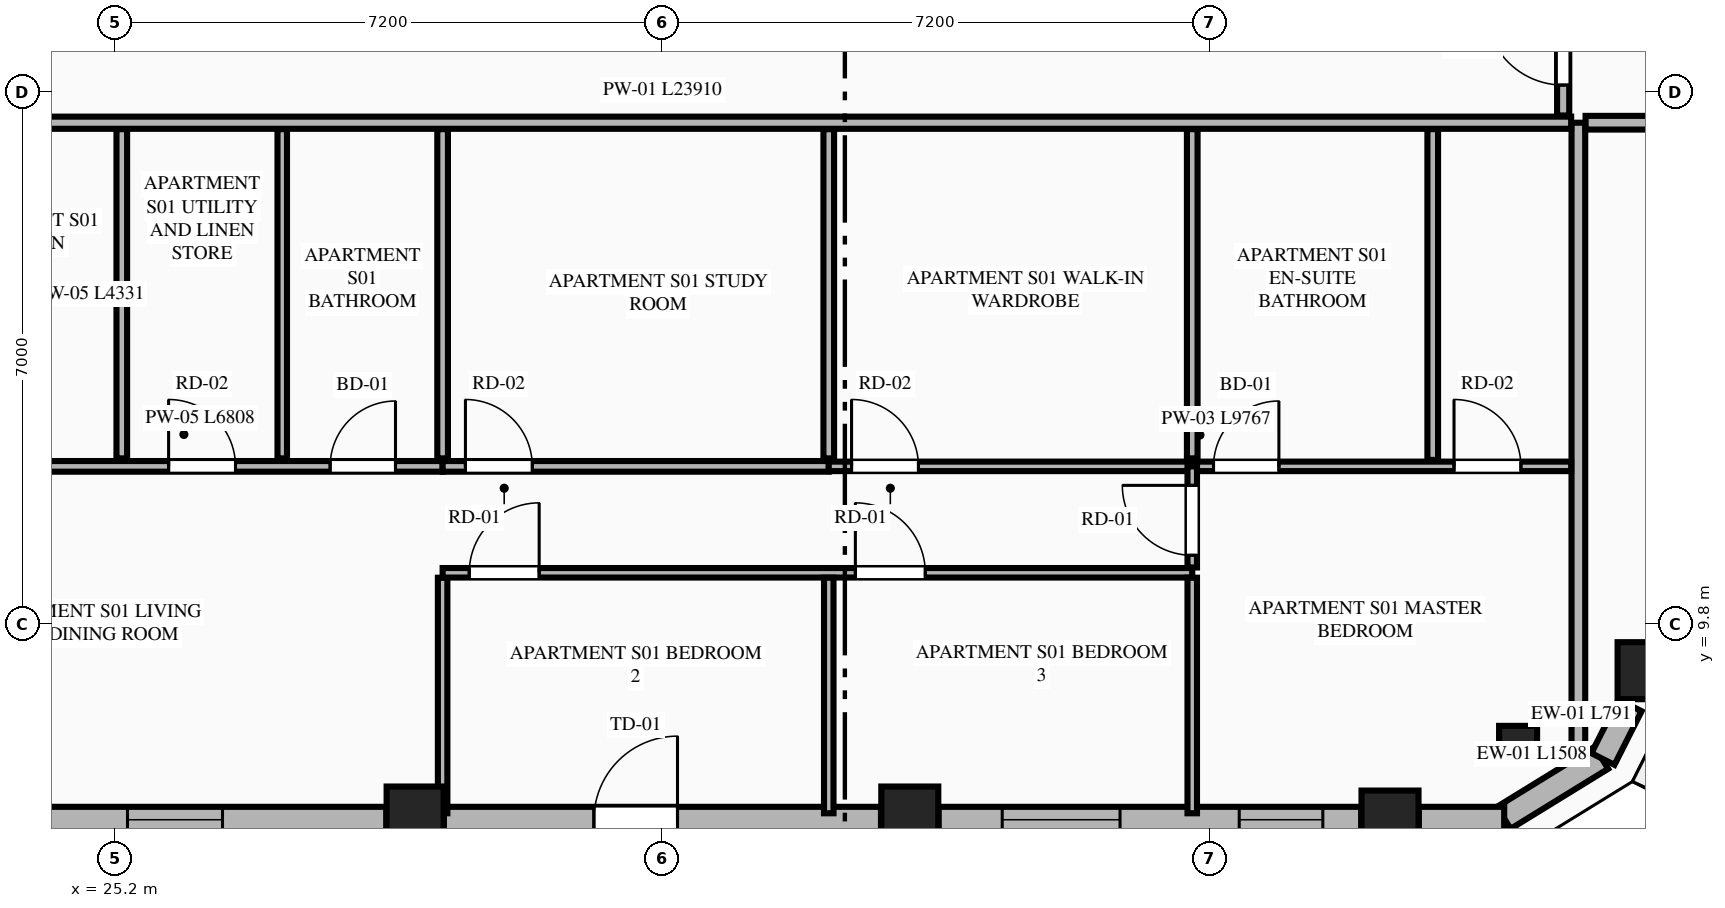
"""IFC4 building model, lengths in metres.
Left out: names, types, materials, properties, quantities, classifications, styles, units other than length and angle.
Written with IfcOpenShell. Run it as: python <this file> out.ifc"""

import sys

from ifc_helpers import new_model, si_unit, direction, frame, frame_2d, origin, origin_2d, place, context, subcontext, project, spatial, rectangle, extrude, element, fill, save


model = new_model("IFC4")
c1 = context("Model", 3, precision=1e-05, world=origin(), true_north=direction((0.0, 1.0)))
c2 = subcontext(c1, "Body", "Model", "MODEL_VIEW")
j1 = project(units=[si_unit("LENGTHUNIT", "METRE"), si_unit("PLANEANGLEUNIT", "RADIAN")], contexts=[c1])
p1 = place(None, origin())
s1 = spatial("IfcSite", under=j1, at=p1, CompositionType="ELEMENT")
p2 = place(p1, origin())
s2 = spatial("IfcBuilding", under=s1, at=p2, CompositionType="ELEMENT")
p3 = place(p2, frame((0.0, 0.0, 252.55)))
s3 = spatial("IfcBuildingStorey", under=s2, at=p3, CompositionType="ELEMENT", Elevation=252.55)
for number, where, z_axis, x_axis in (
    (1, (29.146, 7.292, 0.0), (0.0, 0.0, 1.0), (1.0, 0.0, 0.0)),
    (2, (35.654, 7.292, 0.0), (0.0, 0.0, 1.0), (1.0, 0.0, 0.0)),
    (3, (41.972, 7.239, 0.0), (0.0, 0.0, 1.0), (1.0, 0.0, 0.0)),
    (4, (45.341, 9.191, 0.0), (0.0, 0.0, 1.0), (1.0, 0.0, 0.0)),
):
    element("IfcColumn", number, at=place(p3, frame(where, z_axis=z_axis, x_axis=x_axis)), inside=s3, PredefinedType="COLUMN", context=c2, shape_type="SweptSolid", body=[
        extrude(rectangle(XDim=0.75, YDim=0.75, at=origin_2d()), origin(), (0.0, 0.0, 1.0), 3.65),
    ])
p4 = place(p3, frame((43.657, 8.215, 0.0), z_axis=(0.0, 0.0, 1.0), x_axis=(0.865256437757, 0.501329529272, 0.0)))
e5 = element("IfcColumn", 5, at=p4, inside=s3, PredefinedType="PILASTER", context=c2, shape_type="SweptSolid", body=[
    extrude(rectangle(XDim=0.5, YDim=0.35, at=origin_2d()), origin(), (0.0, 0.0, 1.0), 3.65),
])
p5 = place(p3, frame((43.469, 7.255, 0.0), z_axis=(0.0, 0.0, 1.0), x_axis=(0.851680557619, 0.52406128246, 0.0)))
e6 = element("IfcWall", 6, at=p5, inside=s3, PredefinedType="STANDARD", context=c2, shape_type="SweptSolid", body=[
    extrude(rectangle(XDim=1.508, YDim=0.34, at=frame_2d((0.754, 0.0))), origin(), (0.0, 0.0, 1.0), 3.45),
])
p6 = place(p3, frame((23.207, 7.23, 0.0), z_axis=(0.0, 0.0, 1.0), x_axis=(1.0, 0.0, 0.0)))
e7 = element("IfcWall", 7, at=p6, inside=s3, PredefinedType="STANDARD", context=c2, shape_type="SweptSolid", body=[
    extrude(rectangle(XDim=5.56, YDim=0.34, at=frame_2d((2.78, 0.0))), origin(), (0.0, 0.0, 1.0), 2.983),
])
p7 = place(p6, frame((2.155, 0.0, 0.75)))
e8 = element("IfcOpeningElement", 8, at=p7, cuts=e7, PredefinedType="OPENING", context=c2, shape_type="SweptSolid", body=[
    extrude(rectangle(XDim=1.25, YDim=1.95, at=frame_2d((0.625, 0.975))), frame((0.0, 0.18, 0.0), z_axis=(0.0, -1.0, 0.0), x_axis=(1.0, 0.0, 0.0)), (0.0, 0.0, 1.0), 0.36),
])
p8 = place(p3, frame((29.525, 7.23, 0.0), z_axis=(0.0, 0.0, 1.0), x_axis=(1.0, 0.0, 0.0)))
e9 = element("IfcWall", 9, at=p8, inside=s3, PredefinedType="STANDARD", context=c2, shape_type="SweptSolid", body=[
    extrude(rectangle(XDim=5.75, YDim=0.34, at=frame_2d((2.875, 0.0))), origin(), (0.0, 0.0, 1.0), 2.983),
])
p9 = place(p8, frame((1.973, 0.0, 0.0)))
e10 = element("IfcOpeningElement", 10, at=p9, cuts=e9, PredefinedType="OPENING", context=c2, shape_type="SweptSolid", body=[
    extrude(rectangle(XDim=1.1, YDim=2.25, at=frame_2d((0.55, 1.125))), frame((0.0, 0.18, 0.0), z_axis=(0.0, -1.0, 0.0), x_axis=(1.0, 0.0, 0.0)), (0.0, 0.0, 1.0), 0.36),
])
p10 = place(p3, frame((36.033, 7.23, 0.0), z_axis=(0.0, 0.0, 1.0), x_axis=(1.0, 0.0, 0.0)))
e11 = element("IfcWall", 11, at=p10, inside=s3, PredefinedType="STANDARD", context=c2, shape_type="SweptSolid", body=[
    extrude(rectangle(XDim=5.56, YDim=0.34, at=frame_2d((2.78, 0.0))), origin(), (0.0, 0.0, 1.0), 2.983),
])
p11 = place(p10, frame((0.837, 0.0, 0.75)))
e12 = element("IfcOpeningElement", 12, at=p11, cuts=e11, PredefinedType="OPENING", context=c2, shape_type="SweptSolid", body=[
    extrude(rectangle(XDim=1.55, YDim=2.05, at=frame_2d((0.775, 1.025))), frame((0.0, 0.18, 0.0), z_axis=(0.0, -1.0, 0.0), x_axis=(1.0, 0.0, 0.0)), (0.0, 0.0, 1.0), 0.36),
])
p12 = place(p10, frame((3.955, 0.0, 0.75)))
e13 = element("IfcOpeningElement", 13, at=p12, cuts=e11, PredefinedType="OPENING", context=c2, shape_type="SweptSolid", body=[
    extrude(rectangle(XDim=1.1, YDim=2.0, at=frame_2d((0.55, 1.0))), frame((0.0, 0.18, 0.0), z_axis=(0.0, -1.0, 0.0), x_axis=(1.0, 0.0, 0.0)), (0.0, 0.0, 1.0), 0.36),
])
p13 = place(p3, frame((42.351, 7.23, 0.0), z_axis=(0.0, 0.0, 1.0), x_axis=(1.0, 0.0, 0.0)))
e14 = element("IfcWall", 14, at=p13, inside=s3, PredefinedType="STANDARD", context=c2, shape_type="SweptSolid", body=[
    extrude(rectangle(XDim=1.123, YDim=0.34, at=frame_2d((0.562, 0.0))), origin(), (0.0, 0.0, 1.0), 3.45),
])
p14 = place(p3, frame((44.773, 8.029, 0.0), z_axis=(0.0, 0.0, 1.0), x_axis=(0.451159191899, 0.892443490404, 0.0)))
e15 = element("IfcWall", 15, at=p14, inside=s3, PredefinedType="STANDARD", context=c2, shape_type="SweptSolid", body=[
    extrude(rectangle(XDim=0.791, YDim=0.34, at=frame_2d((0.396, 0.0))), origin(), (0.0, 0.0, 1.0), 3.45),
])
p15 = place(p3, frame((44.45, 8.119, 0.0), z_axis=(0.0, 0.0, 1.0), x_axis=(0.0, 1.0, 0.0)))
e16 = element("IfcWall", 16, at=p15, inside=s3, PredefinedType="PARTITIONING", context=c2, shape_type="SweptSolid", body=[
    extrude(rectangle(XDim=8.281, YDim=0.18, at=frame_2d((4.141, 0.0))), origin(), (0.0, 0.0, 1.0), 3.45),
])
p16 = place(p3, frame((20.445, 16.4, 0.0), z_axis=(0.0, 0.0, 1.0), x_axis=(1.0, 0.0, 0.0)))
e17 = element("IfcWall", 17, at=p16, inside=s3, PredefinedType="PARTITIONING", context=c2, shape_type="SweptSolid", body=[
    extrude(rectangle(XDim=23.91, YDim=0.16, at=frame_2d((11.955, 0.0))), origin(), (0.0, 0.0, 1.0), 3.45),
])
p17 = place(p16, frame((0.705, 0.0, 0.0)))
e18 = element("IfcOpeningElement", 18, at=p17, cuts=e17, PredefinedType="OPENING", context=c2, shape_type="SweptSolid", body=[
    extrude(rectangle(XDim=1.35, YDim=2.35, at=frame_2d((0.675, 1.175))), frame((0.0, 0.09, 0.0), z_axis=(0.0, -1.0, 0.0), x_axis=(1.0, 0.0, 0.0)), (0.0, 0.0, 1.0), 0.18),
])
p18 = place(p3, frame((22.7, 11.879, 0.0), z_axis=(0.0, 0.0, 1.0), x_axis=(1.0, 0.0, 0.0)))
e19 = element("IfcWall", 19, at=p18, inside=s3, PredefinedType="PLUMBINGWALL", context=c2, shape_type="SweptSolid", body=[
    extrude(rectangle(XDim=6.808, YDim=0.14, at=frame_2d((3.404, 0.0))), origin(), (0.0, 0.0, 1.0), 3.45),
])
p19 = place(p18, frame((5.328, 0.0, 0.0)))
e20 = element("IfcOpeningElement", 20, at=p19, cuts=e19, PredefinedType="OPENING", context=c2, shape_type="SweptSolid", body=[
    extrude(rectangle(XDim=0.86, YDim=2.1, at=frame_2d((0.43, 1.05))), frame((0.0, 0.08, 0.0), z_axis=(0.0, -1.0, 0.0), x_axis=(1.0, 0.0, 0.0)), (0.0, 0.0, 1.0), 0.16),
])
p20 = place(p18, frame((0.26, 0.0, 0.0)))
e21 = element("IfcOpeningElement", 21, at=p20, cuts=e19, PredefinedType="OPENING", context=c2, shape_type="SweptSolid", body=[
    extrude(rectangle(XDim=0.88, YDim=2.15, at=frame_2d((0.44, 1.075))), frame((0.0, 0.08, 0.0), z_axis=(0.0, -1.0, 0.0), x_axis=(1.0, 0.0, 0.0)), (0.0, 0.0, 1.0), 0.16),
])
p21 = place(p18, frame((3.203, 0.0, 0.0)))
e22 = element("IfcOpeningElement", 22, at=p21, cuts=e19, PredefinedType="OPENING", context=c2, shape_type="SweptSolid", body=[
    extrude(rectangle(XDim=0.88, YDim=2.15, at=frame_2d((0.44, 1.075))), frame((0.0, 0.08, 0.0), z_axis=(0.0, -1.0, 0.0), x_axis=(1.0, 0.0, 0.0)), (0.0, 0.0, 1.0), 0.16),
])
p22 = place(p3, frame((29.508, 11.879, 0.0), z_axis=(0.0, 0.0, 1.0), x_axis=(1.0, 0.0, 0.0)))
e23 = element("IfcWall", 23, at=p22, inside=s3, PredefinedType="PLUMBINGWALL", context=c2, shape_type="SweptSolid", body=[
    extrude(rectangle(XDim=5.08, YDim=0.14, at=frame_2d((2.54, 0.0))), origin(), (0.0, 0.0, 1.0), 3.45),
])
p23 = place(p22, frame((0.3, 0.0, 0.0)))
e24 = element("IfcOpeningElement", 24, at=p23, cuts=e23, PredefinedType="OPENING", context=c2, shape_type="SweptSolid", body=[
    extrude(rectangle(XDim=0.88, YDim=2.15, at=frame_2d((0.44, 1.075))), frame((0.0, 0.08, 0.0), z_axis=(0.0, -1.0, 0.0), x_axis=(1.0, 0.0, 0.0)), (0.0, 0.0, 1.0), 0.16),
])
p24 = place(p3, frame((34.588, 11.879, 0.0), z_axis=(0.0, 0.0, 1.0), x_axis=(1.0, 0.0, 0.0)))
e25 = element("IfcWall", 25, at=p24, inside=s3, PredefinedType="PARTITIONING", context=c2, shape_type="SweptSolid", body=[
    extrude(rectangle(XDim=9.767, YDim=0.125, at=frame_2d((4.884, 0.0))), origin(), (0.0, 0.0, 1.0), 3.45),
])
p25 = place(p24, frame((5.062, 0.0, 0.0)))
e26 = element("IfcOpeningElement", 26, at=p25, cuts=e25, PredefinedType="OPENING", context=c2, shape_type="SweptSolid", body=[
    extrude(rectangle(XDim=0.86, YDim=2.1, at=frame_2d((0.43, 1.05))), frame((0.0, 0.073, 0.0), z_axis=(0.0, -1.0, 0.0), x_axis=(1.0, 0.0, 0.0)), (0.0, 0.0, 1.0), 0.145),
])
p26 = place(p24, frame((8.226, 0.0, 0.0)))
e27 = element("IfcOpeningElement", 27, at=p26, cuts=e25, PredefinedType="OPENING", context=c2, shape_type="SweptSolid", body=[
    extrude(rectangle(XDim=0.88, YDim=2.15, at=frame_2d((0.44, 1.075))), frame((0.0, 0.073, 0.0), z_axis=(0.0, -1.0, 0.0), x_axis=(1.0, 0.0, 0.0)), (0.0, 0.0, 1.0), 0.145),
])
p27 = place(p24, frame((0.3, 0.0, 0.0)))
e28 = element("IfcOpeningElement", 28, at=p27, cuts=e25, PredefinedType="OPENING", context=c2, shape_type="SweptSolid", body=[
    extrude(rectangle(XDim=0.88, YDim=2.15, at=frame_2d((0.44, 1.075))), frame((0.0, 0.073, 0.0), z_axis=(0.0, -1.0, 0.0), x_axis=(1.0, 0.0, 0.0)), (0.0, 0.0, 1.0), 0.145),
])
p28 = place(p3, frame((25.287, 11.984, 0.0), z_axis=(0.0, 0.0, 1.0), x_axis=(0.0, 1.0, 0.0)))
e29 = element("IfcWall", 29, at=p28, inside=s3, PredefinedType="PLUMBINGWALL", context=c2, shape_type="SweptSolid", body=[
    extrude(rectangle(XDim=4.331, YDim=0.14, at=frame_2d((2.166, 0.0))), origin(), (0.0, 0.0, 1.0), 3.45),
])
p29 = place(p3, frame((27.398, 11.984, 0.0), z_axis=(0.0, 0.0, 1.0), x_axis=(0.0, 1.0, 0.0)))
e30 = element("IfcWall", 30, at=p29, inside=s3, PredefinedType="PARTITIONING", context=c2, shape_type="SweptSolid", body=[
    extrude(rectangle(XDim=4.331, YDim=0.125, at=frame_2d((2.166, 0.0))), origin(), (0.0, 0.0, 1.0), 3.45),
])
p30 = place(p3, frame((29.508, 7.315, 0.0), z_axis=(0.0, 0.0, 1.0), x_axis=(0.0, 1.0, 0.0)))
e31 = element("IfcWall", 31, at=p30, inside=s3, PredefinedType="PARTITIONING", context=c2, shape_type="SweptSolid", body=[
    extrude(rectangle(XDim=3.099, YDim=0.125, at=frame_2d((1.55, 0.0))), origin(), (0.0, 0.0, 1.0), 3.45),
])
p31 = place(p3, frame((29.508, 10.479, 0.0), z_axis=(0.0, 0.0, 1.0), x_axis=(1.0, 0.0, 0.0)))
e32 = element("IfcWall", 32, at=p31, inside=s3, PredefinedType="PARTITIONING", context=c2, shape_type="SweptSolid", body=[
    extrude(rectangle(XDim=9.862, YDim=0.125, at=frame_2d((4.931, 0.0))), origin(), (0.0, 0.0, 1.0), 3.45),
])
p32 = place(p31, frame((0.35, 0.0, 0.0)))
e33 = element("IfcOpeningElement", 33, at=p32, cuts=e32, PredefinedType="OPENING", context=c2, shape_type="SweptSolid", body=[
    extrude(rectangle(XDim=0.92, YDim=2.15, at=frame_2d((0.46, 1.075))), frame((0.0, 0.073, 0.0), z_axis=(0.0, -1.0, 0.0), x_axis=(1.0, 0.0, 0.0)), (0.0, 0.0, 1.0), 0.145),
])
p33 = place(p31, frame((5.43, 0.0, 0.0)))
e34 = element("IfcOpeningElement", 34, at=p33, cuts=e32, PredefinedType="OPENING", context=c2, shape_type="SweptSolid", body=[
    extrude(rectangle(XDim=0.92, YDim=2.15, at=frame_2d((0.46, 1.075))), frame((0.0, 0.073, 0.0), z_axis=(0.0, -1.0, 0.0), x_axis=(1.0, 0.0, 0.0)), (0.0, 0.0, 1.0), 0.145),
])
p34 = place(p3, frame((39.37, 10.549, 0.0), z_axis=(0.0, 0.0, 1.0), x_axis=(0.0, 1.0, 0.0)))
e35 = element("IfcWall", 35, at=p34, inside=s3, PredefinedType="PARTITIONING", context=c2, shape_type="SweptSolid", body=[
    extrude(rectangle(XDim=1.33, YDim=0.125, at=frame_2d((0.665, 0.0))), origin(), (0.0, 0.0, 1.0), 3.45),
])
p35 = place(p34, frame((0.16, 0.0, 0.0)))
e36 = element("IfcOpeningElement", 36, at=p35, cuts=e35, PredefinedType="OPENING", context=c2, shape_type="SweptSolid", body=[
    extrude(rectangle(XDim=0.92, YDim=2.15, at=frame_2d((0.46, 1.075))), frame((0.0, 0.073, 0.0), z_axis=(0.0, -1.0, 0.0), x_axis=(1.0, 0.0, 0.0)), (0.0, 0.0, 1.0), 0.145),
])
for number, where, z_axis, x_axis in (
    (37, (29.508, 11.984, 0.0), (0.0, 0.0, 1.0), (0.0, 1.0, 0.0)),
    (38, (34.588, 11.984, 0.0), (0.0, 0.0, 1.0), (0.0, 1.0, 0.0)),
):
    element("IfcWall", number, at=place(p3, frame(where, z_axis=z_axis, x_axis=x_axis)), inside=s3, PredefinedType="PLUMBINGWALL", context=c2, shape_type="SweptSolid", body=[
        extrude(rectangle(XDim=4.331, YDim=0.14, at=frame_2d((2.166, 0.0))), origin(), (0.0, 0.0, 1.0), 3.45),
    ])
for number, where, z_axis, x_axis in (
    (39, (34.588, 7.315, 0.0), (0.0, 0.0, 1.0), (0.0, 1.0, 0.0)),
    (40, (39.37, 7.315, 0.0), (0.0, 0.0, 1.0), (0.0, 1.0, 0.0)),
):
    element("IfcWall", number, at=place(p3, frame(where, z_axis=z_axis, x_axis=x_axis)), inside=s3, PredefinedType="PARTITIONING", context=c2, shape_type="SweptSolid", body=[
        extrude(rectangle(XDim=3.099, YDim=0.125, at=frame_2d((1.55, 0.0))), origin(), (0.0, 0.0, 1.0), 3.45),
    ])
p36 = place(p3, frame((39.37, 11.984, 0.0), z_axis=(0.0, 0.0, 1.0), x_axis=(0.0, 1.0, 0.0)))
e41 = element("IfcWall", 41, at=p36, inside=s3, PredefinedType="PLUMBINGWALL", context=c2, shape_type="SweptSolid", body=[
    extrude(rectangle(XDim=4.331, YDim=0.14, at=frame_2d((2.166, 0.0))), origin(), (0.0, 0.0, 1.0), 3.45),
])
p37 = place(p3, frame((42.534, 11.964, 0.0), z_axis=(0.0, 0.0, 1.0), x_axis=(0.0, 1.0, 0.0)))
e42 = element("IfcWall", 42, at=p37, inside=s3, PredefinedType="PLUMBINGWALL", context=c2, shape_type="SweptSolid", body=[
    extrude(rectangle(XDim=4.351, YDim=0.14, at=frame_2d((2.175, 0.0))), origin(), (0.0, 0.0, 1.0), 3.45),
])
p38 = place(p3, frame((44.545, 16.4, 0.0), z_axis=(0.0, 0.0, 1.0), x_axis=(1.0, 0.0, 0.0)))
e43 = element("IfcWall", 43, at=p38, inside=s3, PredefinedType="PARTITIONING", context=c2, shape_type="SweptSolid", body=[
    extrude(rectangle(XDim=4.221, YDim=0.18, at=frame_2d((2.111, 0.0))), origin(), (0.0, 0.0, 1.0), 3.45),
])
p39 = place(p3, frame((44.25, 16.495, 0.0), z_axis=(0.0, 0.0, 1.0), x_axis=(0.0, 1.0, 0.0)))
e44 = element("IfcWall", 44, at=p39, inside=s3, PredefinedType="PARTITIONING", context=c2, shape_type="SweptSolid", body=[
    extrude(rectangle(XDim=6.134, YDim=0.16, at=frame_2d((3.067, 0.0))), origin(), (0.0, 0.0, 1.0), 3.137),
])
p40 = place(p39, frame((0.4, 0.0, 0.0)))
e45 = element("IfcOpeningElement", 45, at=p40, cuts=e44, PredefinedType="OPENING", context=c2, shape_type="SweptSolid", body=[
    extrude(rectangle(XDim=1.02, YDim=2.25, at=frame_2d((0.51, 1.125))), frame((0.0, 0.09, 0.0), z_axis=(0.0, -1.0, 0.0), x_axis=(1.0, 0.0, 0.0)), (0.0, 0.0, 1.0), 0.18),
])
p41 = place(p7, origin())
e46 = element("IfcWindow", 46, at=p41, inside=s3, PartitioningType="SINGLE_PANEL", PredefinedType="WINDOW", context=c2, shape_type="SweptSolid", body=[
    extrude(rectangle(XDim=1.25, YDim=1.95, at=frame_2d((0.625, 0.975))), frame((0.0, 0.03, 0.0), z_axis=(0.0, -1.0, 0.0), x_axis=(1.0, 0.0, 0.0)), (0.0, 0.0, 1.0), 0.06),
])
fill(e8, e46)
p42 = place(p9, origin())
e47 = element("IfcDoor", 47, at=p42, inside=s3, OperationType="SINGLE_SWING_RIGHT", PredefinedType="DOOR", context=c2, shape_type="SweptSolid", body=[
    extrude(rectangle(XDim=1.1, YDim=2.25, at=frame_2d((0.55, 1.125))), frame((0.0, 0.025, 0.0), z_axis=(0.0, -1.0, 0.0), x_axis=(1.0, 0.0, 0.0)), (0.0, 0.0, 1.0), 0.05),
])
fill(e10, e47)
p43 = place(p11, origin())
e48 = element("IfcWindow", 48, at=p43, inside=s3, PartitioningType="SINGLE_PANEL", PredefinedType="WINDOW", context=c2, shape_type="SweptSolid", body=[
    extrude(rectangle(XDim=1.55, YDim=2.05, at=frame_2d((0.775, 1.025))), frame((0.0, 0.03, 0.0), z_axis=(0.0, -1.0, 0.0), x_axis=(1.0, 0.0, 0.0)), (0.0, 0.0, 1.0), 0.06),
])
fill(e12, e48)
p44 = place(p19, origin())
e49 = element("IfcDoor", 49, at=p44, inside=s3, OperationType="SINGLE_SWING_RIGHT", PredefinedType="DOOR", context=c2, shape_type="SweptSolid", body=[
    extrude(rectangle(XDim=0.86, YDim=2.1, at=frame_2d((0.43, 1.05))), frame((0.0, 0.025, 0.0), z_axis=(0.0, -1.0, 0.0), x_axis=(1.0, 0.0, 0.0)), (0.0, 0.0, 1.0), 0.05),
])
fill(e20, e49)
p45 = place(p25, origin())
e50 = element("IfcDoor", 50, at=p45, inside=s3, OperationType="SINGLE_SWING_RIGHT", PredefinedType="DOOR", context=c2, shape_type="SweptSolid", body=[
    extrude(rectangle(XDim=0.86, YDim=2.1, at=frame_2d((0.43, 1.05))), frame((0.0, 0.025, 0.0), z_axis=(0.0, -1.0, 0.0), x_axis=(1.0, 0.0, 0.0)), (0.0, 0.0, 1.0), 0.05),
])
fill(e26, e50)
p46 = place(p26, origin())
e51 = element("IfcDoor", 51, at=p46, inside=s3, OperationType="SINGLE_SWING_LEFT", PredefinedType="DOOR", context=c2, shape_type="SweptSolid", body=[
    extrude(rectangle(XDim=0.88, YDim=2.15, at=frame_2d((0.44, 1.075))), frame((0.0, 0.025, 0.0), z_axis=(0.0, -1.0, 0.0), x_axis=(1.0, 0.0, 0.0)), (0.0, 0.0, 1.0), 0.05),
])
fill(e27, e51)
p47 = place(p21, origin())
e52 = element("IfcDoor", 52, at=p47, inside=s3, OperationType="SINGLE_SWING_LEFT", PredefinedType="DOOR", context=c2, shape_type="SweptSolid", body=[
    extrude(rectangle(XDim=0.88, YDim=2.15, at=frame_2d((0.44, 1.075))), frame((0.0, 0.025, 0.0), z_axis=(0.0, -1.0, 0.0), x_axis=(1.0, 0.0, 0.0)), (0.0, 0.0, 1.0), 0.05),
])
fill(e22, e52)
p48 = place(p23, origin())
e53 = element("IfcDoor", 53, at=p48, inside=s3, OperationType="SINGLE_SWING_LEFT", PredefinedType="DOOR", context=c2, shape_type="SweptSolid", body=[
    extrude(rectangle(XDim=0.88, YDim=2.15, at=frame_2d((0.44, 1.075))), frame((0.0, 0.025, 0.0), z_axis=(0.0, -1.0, 0.0), x_axis=(1.0, 0.0, 0.0)), (0.0, 0.0, 1.0), 0.05),
])
fill(e24, e53)
p49 = place(p32, origin())
e54 = element("IfcDoor", 54, at=p49, inside=s3, OperationType="SINGLE_SWING_RIGHT", PredefinedType="DOOR", context=c2, shape_type="SweptSolid", body=[
    extrude(rectangle(XDim=0.92, YDim=2.15, at=frame_2d((0.46, 1.075))), frame((0.0, 0.025, 0.0), z_axis=(0.0, -1.0, 0.0), x_axis=(1.0, 0.0, 0.0)), (0.0, 0.0, 1.0), 0.05),
])
fill(e33, e54)
p50 = place(p33, origin())
e55 = element("IfcDoor", 55, at=p50, inside=s3, OperationType="SINGLE_SWING_LEFT", PredefinedType="DOOR", context=c2, shape_type="SweptSolid", body=[
    extrude(rectangle(XDim=0.92, YDim=2.15, at=frame_2d((0.46, 1.075))), frame((0.0, 0.025, 0.0), z_axis=(0.0, -1.0, 0.0), x_axis=(1.0, 0.0, 0.0)), (0.0, 0.0, 1.0), 0.05),
])
fill(e34, e55)
p51 = place(p35, origin())
e56 = element("IfcDoor", 56, at=p51, inside=s3, OperationType="SINGLE_SWING_RIGHT", PredefinedType="DOOR", context=c2, shape_type="SweptSolid", body=[
    extrude(rectangle(XDim=0.92, YDim=2.15, at=frame_2d((0.46, 1.075))), frame((0.0, 0.025, 0.0), z_axis=(0.0, -1.0, 0.0), x_axis=(1.0, 0.0, 0.0)), (0.0, 0.0, 1.0), 0.05),
])
fill(e36, e56)
p52 = place(p27, origin())
e57 = element("IfcDoor", 57, at=p52, inside=s3, OperationType="SINGLE_SWING_LEFT", PredefinedType="DOOR", context=c2, shape_type="SweptSolid", body=[
    extrude(rectangle(XDim=0.88, YDim=2.15, at=frame_2d((0.44, 1.075))), frame((0.0, 0.025, 0.0), z_axis=(0.0, -1.0, 0.0), x_axis=(1.0, 0.0, 0.0)), (0.0, 0.0, 1.0), 0.05),
])
fill(e28, e57)
p53 = place(p40, origin())
e58 = element("IfcDoor", 58, at=p53, inside=s3, OperationType="SINGLE_SWING_RIGHT", PredefinedType="DOOR", context=c2, shape_type="SweptSolid", body=[
    extrude(rectangle(XDim=1.02, YDim=2.25, at=frame_2d((0.51, 1.125))), frame((0.0, 0.025, 0.0), z_axis=(0.0, -1.0, 0.0), x_axis=(1.0, 0.0, 0.0)), (0.0, 0.0, 1.0), 0.05),
])
fill(e45, e58)
p54 = place(p12, origin())
e59 = element("IfcWindow", 59, at=p54, inside=s3, PartitioningType="SINGLE_PANEL", PredefinedType="WINDOW", context=c2, shape_type="SweptSolid", body=[
    extrude(rectangle(XDim=1.1, YDim=2.0, at=frame_2d((0.55, 1.0))), frame((0.0, 0.03, 0.0), z_axis=(0.0, -1.0, 0.0), x_axis=(1.0, 0.0, 0.0)), (0.0, 0.0, 1.0), 0.06),
])
fill(e13, e59)
save(model, sys.argv[1])
